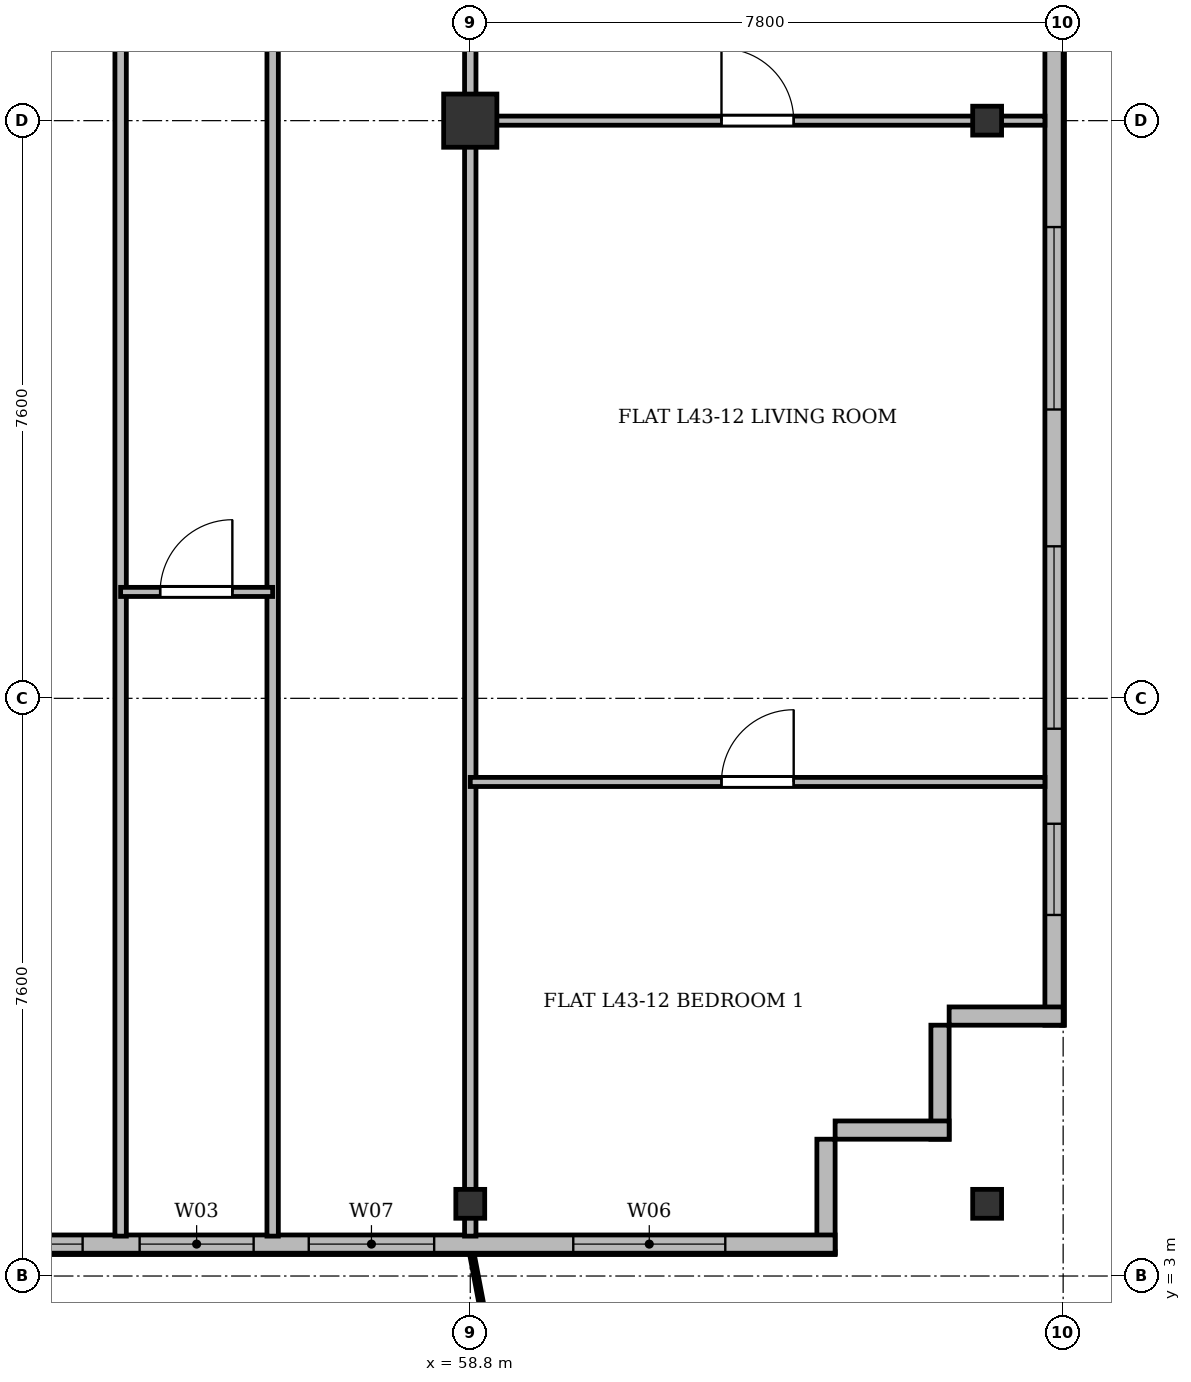
"""IFC4 building model, lengths in metres.
Left out: names, types, materials, properties, quantities, classifications, styles, units other than length and angle.
Written with IfcOpenShell. Run it as: python <this file> out.ifc"""

import sys

from ifc_helpers import new_model, si_unit, direction, frame, frame_2d, origin, origin_2d, place, context, subcontext, project, spatial, rectangle, i_section, extrude, source, transform, mapped, element, fill, save


model = new_model("IFC4")
c1 = context("Model", 3, precision=1e-05, world=origin(), true_north=direction((0.0, 1.0)))
c2 = subcontext(c1, "Body", "Model", "MODEL_VIEW")
j1 = project(units=[si_unit("LENGTHUNIT", "METRE"), si_unit("PLANEANGLEUNIT", "RADIAN")], contexts=[c1])
p1 = place(None, origin())
s1 = spatial("IfcSite", under=j1, at=p1, CompositionType="ELEMENT")
p2 = place(p1, origin())
s2 = spatial("IfcBuilding", under=s1, at=p2, CompositionType="ELEMENT")
p3 = place(p2, frame((0.0, 0.0, 164.5)))
s3 = spatial("IfcBuildingStorey", under=s2, at=p3, CompositionType="ELEMENT", Elevation=164.5)
m1 = source(origin(), c2, "Body", "SweptSolid", [
    extrude(i_section(OverallWidth=0.38, OverallDepth=0.38, WebThickness=0.02, FlangeThickness=0.03, at=origin_2d()), origin(), (0.0, 0.0, 1.0), 3.6),
])
p4 = place(p3, frame((58.8, 3.95, 0.0), z_axis=(0.0, 0.0, 1.0), x_axis=(1.0, 0.0, 0.0)))
e1 = element("IfcColumn", 1, at=p4, inside=s3, PredefinedType="COLUMN", context=c2, shape_type="MappedRepresentation", body=[
    mapped(m1, transform((0.0, 0.0, 0.0), x_axis=(1.0, 0.0, 0.0), y_axis=(0.0, 1.0, 0.0), z_axis=(0.0, 0.0, 1.0), scale=1.0)),
])
m2 = source(origin(), c2, "Body", "SweptSolid", [
    extrude(rectangle(XDim=0.7, YDim=0.7, at=origin_2d()), origin(), (0.0, 0.0, 1.0), 3.6),
])
p5 = place(p3, frame((58.8, 18.2, 0.0), z_axis=(0.0, 0.0, 1.0), x_axis=(1.0, 0.0, 0.0)))
e2 = element("IfcColumn", 2, at=p5, inside=s3, PredefinedType="COLUMN", context=c2, shape_type="MappedRepresentation", body=[
    mapped(m2, transform((0.0, 0.0, 0.0), x_axis=(1.0, 0.0, 0.0), y_axis=(0.0, 1.0, 0.0), z_axis=(0.0, 0.0, 1.0), scale=1.0)),
])
for number, where, z_axis, x_axis in (
    (3, (65.6, 3.95, 0.0), (0.0, 0.0, 1.0), (1.0, 0.0, 0.0)),
    (4, (65.6, 18.2, 0.0), (0.0, 0.0, 1.0), (1.0, 0.0, 0.0)),
):
    element("IfcColumn", number, at=place(p3, frame(where, z_axis=z_axis, x_axis=x_axis)), inside=s3, PredefinedType="COLUMN", context=c2, shape_type="MappedRepresentation", body=[
        mapped(m1, transform((0.0, 0.0, 0.0), x_axis=(1.0, 0.0, 0.0), y_axis=(0.0, 1.0, 0.0), z_axis=(0.0, 0.0, 1.0), scale=1.0)),
    ])
p6 = place(p3, frame((66.48, 45.5, 0.0), z_axis=(0.0, 0.0, 1.0), x_axis=(0.0, -1.0, 0.0)))
e5 = element("IfcWall", 5, at=p6, inside=s3, PredefinedType="SOLIDWALL", context=c2, shape_type="SweptSolid", body=[
    extrude(rectangle(XDim=39.2, YDim=0.24, at=frame_2d((19.6, 0.0))), origin(), (0.0, 0.0, 1.0), 3.35),
])
p7 = place(p6, frame((36.55, 0.0, 0.92)))
e6 = element("IfcOpeningElement", 6, at=p7, cuts=e5, PredefinedType="OPENING", context=c2, shape_type="SweptSolid", body=[
    extrude(rectangle(XDim=1.2, YDim=1.65, at=frame_2d((0.6, 0.825))), frame((0.0, 0.13, 0.0), z_axis=(0.0, -1.0, 0.0), x_axis=(1.0, 0.0, 0.0)), (0.0, 0.0, 1.0), 0.26),
])
p8 = place(p6, frame((32.9, 0.0, 0.92)))
e7 = element("IfcOpeningElement", 7, at=p8, cuts=e5, PredefinedType="OPENING", context=c2, shape_type="SweptSolid", body=[
    extrude(rectangle(XDim=2.4, YDim=2.1, at=frame_2d((1.2, 1.05))), frame((0.0, 0.13, 0.0), z_axis=(0.0, -1.0, 0.0), x_axis=(1.0, 0.0, 0.0)), (0.0, 0.0, 1.0), 0.26),
])
p9 = place(p6, frame((28.7, 0.0, 0.92)))
e8 = element("IfcOpeningElement", 8, at=p9, cuts=e5, PredefinedType="OPENING", context=c2, shape_type="SweptSolid", body=[
    extrude(rectangle(XDim=2.4, YDim=2.1, at=frame_2d((1.2, 1.05))), frame((0.0, 0.13, 0.0), z_axis=(0.0, -1.0, 0.0), x_axis=(1.0, 0.0, 0.0)), (0.0, 0.0, 1.0), 0.26),
])
p10 = place(p6, frame((21.5, 0.0, 0.92)))
e9 = element("IfcOpeningElement", 9, at=p10, cuts=e5, PredefinedType="OPENING", context=c2, shape_type="SweptSolid", body=[
    extrude(rectangle(XDim=2.4, YDim=2.1, at=frame_2d((1.2, 1.05))), frame((0.0, 0.13, 0.0), z_axis=(0.0, -1.0, 0.0), x_axis=(1.0, 0.0, 0.0)), (0.0, 0.0, 1.0), 0.26),
])
p11 = place(p6, frame((7.5, 0.0, 0.92)))
e10 = element("IfcOpeningElement", 10, at=p11, cuts=e5, PredefinedType="OPENING", context=c2, shape_type="SweptSolid", body=[
    extrude(rectangle(XDim=2.4, YDim=2.1, at=frame_2d((1.2, 1.05))), frame((0.0, 0.13, 0.0), z_axis=(0.0, -1.0, 0.0), x_axis=(1.0, 0.0, 0.0)), (0.0, 0.0, 1.0), 0.26),
])
p12 = place(p6, frame((1.15, 0.0, 0.92)))
e11 = element("IfcOpeningElement", 11, at=p12, cuts=e5, PredefinedType="OPENING", context=c2, shape_type="SweptSolid", body=[
    extrude(rectangle(XDim=1.2, YDim=1.65, at=frame_2d((0.6, 0.825))), frame((0.0, 0.13, 0.0), z_axis=(0.0, -1.0, 0.0), x_axis=(1.0, 0.0, 0.0)), (0.0, 0.0, 1.0), 0.26),
])
p13 = place(p3, frame((66.6, 6.42, 0.0), z_axis=(0.0, 0.0, 1.0), x_axis=(-1.0, 0.0, 0.0)))
e12 = element("IfcWall", 12, at=p13, inside=s3, PredefinedType="SOLIDWALL", context=c2, shape_type="SweptSolid", body=[
    extrude(rectangle(XDim=1.5, YDim=0.24, at=frame_2d((0.75, 0.0))), origin(), (0.0, 0.0, 1.0), 2.85),
])
for number, where, z_axis, x_axis in (
    (13, (64.98, 6.3, 0.0), (0.0, 0.0, 1.0), (0.0, -1.0, 0.0)),
    (14, (65.1, 4.92, 0.0), (0.0, 0.0, 1.0), (-1.0, 0.0, 0.0)),
):
    element("IfcWall", number, at=place(p3, frame(where, z_axis=z_axis, x_axis=x_axis)), inside=s3, PredefinedType="SOLIDWALL", context=c2, shape_type="SweptSolid", body=[
        extrude(rectangle(XDim=1.5, YDim=0.24, at=frame_2d((0.75, 0.0))), origin(), (0.0, 0.0, 1.0), 3.35),
    ])
p14 = place(p3, frame((63.48, 4.8, 0.0), z_axis=(0.0, 0.0, 1.0), x_axis=(0.0, -1.0, 0.0)))
e15 = element("IfcWall", 15, at=p14, inside=s3, PredefinedType="SOLIDWALL", context=c2, shape_type="SweptSolid", body=[
    extrude(rectangle(XDim=1.5, YDim=0.24, at=frame_2d((0.75, 0.0))), origin(), (0.0, 0.0, 1.0), 2.75),
])
p15 = place(p3, frame((63.6, 3.42, 0.0), z_axis=(0.0, 0.0, 1.0), x_axis=(-1.0, 0.0, 0.0)))
e16 = element("IfcWall", 16, at=p15, inside=s3, PredefinedType="SOLIDWALL", context=c2, shape_type="SweptSolid", body=[
    extrude(rectangle(XDim=52.8, YDim=0.24, at=frame_2d((26.4, 0.0))), origin(), (0.0, 0.0, 1.0), 3.35),
])
p16 = place(p15, frame((1.445, 0.0, 0.9)))
e17 = element("IfcOpeningElement", 17, at=p16, cuts=e16, PredefinedType="OPENING", context=c2, shape_type="SweptSolid", body=[
    extrude(rectangle(XDim=2.0, YDim=1.95, at=frame_2d((1.0, 0.975))), frame((0.0, 0.13, 0.0), z_axis=(0.0, -1.0, 0.0), x_axis=(1.0, 0.0, 0.0)), (0.0, 0.0, 1.0), 0.26),
])
p17 = place(p15, frame((5.275, 0.0, 0.9)))
e18 = element("IfcOpeningElement", 18, at=p17, cuts=e16, PredefinedType="OPENING", context=c2, shape_type="SweptSolid", body=[
    extrude(rectangle(XDim=1.65, YDim=1.85, at=frame_2d((0.825, 0.925))), frame((0.0, 0.13, 0.0), z_axis=(0.0, -1.0, 0.0), x_axis=(1.0, 0.0, 0.0)), (0.0, 0.0, 1.0), 0.26),
])
p18 = place(p15, frame((7.65, 0.0, 0.9)))
e19 = element("IfcOpeningElement", 19, at=p18, cuts=e16, PredefinedType="OPENING", context=c2, shape_type="SweptSolid", body=[
    extrude(rectangle(XDim=1.5, YDim=1.75, at=frame_2d((0.75, 0.875))), frame((0.0, 0.13, 0.0), z_axis=(0.0, -1.0, 0.0), x_axis=(1.0, 0.0, 0.0)), (0.0, 0.0, 1.0), 0.26),
])
p19 = place(p15, frame((9.9, 0.0, 0.9)))
e20 = element("IfcOpeningElement", 20, at=p19, cuts=e16, PredefinedType="OPENING", context=c2, shape_type="SweptSolid", body=[
    extrude(rectangle(XDim=2.2, YDim=1.8, at=frame_2d((1.1, 0.9))), frame((0.0, 0.13, 0.0), z_axis=(0.0, -1.0, 0.0), x_axis=(1.0, 0.0, 0.0)), (0.0, 0.0, 1.0), 0.26),
])
p20 = place(p15, frame((13.62, 0.0, 0.0)))
e21 = element("IfcOpeningElement", 21, at=p20, cuts=e16, PredefinedType="OPENING", context=c2, shape_type="SweptSolid", body=[
    extrude(rectangle(XDim=1.2, YDim=2.2, at=frame_2d((0.6, 1.1))), frame((0.0, 0.13, 0.0), z_axis=(0.0, -1.0, 0.0), x_axis=(1.0, 0.0, 0.0)), (0.0, 0.0, 1.0), 0.26),
])
p21 = place(p15, frame((15.45, 0.0, 0.9)))
e22 = element("IfcOpeningElement", 22, at=p21, cuts=e16, PredefinedType="OPENING", context=c2, shape_type="SweptSolid", body=[
    extrude(rectangle(XDim=1.5, YDim=1.75, at=frame_2d((0.75, 0.875))), frame((0.0, 0.13, 0.0), z_axis=(0.0, -1.0, 0.0), x_axis=(1.0, 0.0, 0.0)), (0.0, 0.0, 1.0), 0.26),
])
p22 = place(p15, frame((17.775, 0.0, 0.9)))
e23 = element("IfcOpeningElement", 23, at=p22, cuts=e16, PredefinedType="OPENING", context=c2, shape_type="SweptSolid", body=[
    extrude(rectangle(XDim=1.65, YDim=1.85, at=frame_2d((0.825, 0.925))), frame((0.0, 0.13, 0.0), z_axis=(0.0, -1.0, 0.0), x_axis=(1.0, 0.0, 0.0)), (0.0, 0.0, 1.0), 0.26),
])
p23 = place(p15, frame((22.2, 0.0, 0.9)))
e24 = element("IfcOpeningElement", 24, at=p23, cuts=e16, PredefinedType="OPENING", context=c2, shape_type="SweptSolid", body=[
    extrude(rectangle(XDim=1.8, YDim=1.8, at=frame_2d((0.9, 0.9))), frame((0.0, 0.13, 0.0), z_axis=(0.0, -1.0, 0.0), x_axis=(1.0, 0.0, 0.0)), (0.0, 0.0, 1.0), 0.26),
])
p24 = place(p15, frame((28.6, 0.0, 0.9)))
e25 = element("IfcOpeningElement", 25, at=p24, cuts=e16, PredefinedType="OPENING", context=c2, shape_type="SweptSolid", body=[
    extrude(rectangle(XDim=2.2, YDim=1.8, at=frame_2d((1.1, 0.9))), frame((0.0, 0.13, 0.0), z_axis=(0.0, -1.0, 0.0), x_axis=(1.0, 0.0, 0.0)), (0.0, 0.0, 1.0), 0.26),
])
p25 = place(p15, frame((35.85, 0.0, 0.9)))
e26 = element("IfcOpeningElement", 26, at=p25, cuts=e16, PredefinedType="OPENING", context=c2, shape_type="SweptSolid", body=[
    extrude(rectangle(XDim=1.5, YDim=1.75, at=frame_2d((0.75, 0.875))), frame((0.0, 0.13, 0.0), z_axis=(0.0, -1.0, 0.0), x_axis=(1.0, 0.0, 0.0)), (0.0, 0.0, 1.0), 0.26),
])
p26 = place(p15, frame((41.656, 0.0, 0.0)))
e27 = element("IfcOpeningElement", 27, at=p26, cuts=e16, PredefinedType="OPENING", context=c2, shape_type="SweptSolid", body=[
    extrude(rectangle(XDim=1.2, YDim=2.2, at=frame_2d((0.6, 1.1))), frame((0.0, 0.13, 0.0), z_axis=(0.0, -1.0, 0.0), x_axis=(1.0, 0.0, 0.0)), (0.0, 0.0, 1.0), 0.26),
])
p27 = place(p15, frame((43.65, 0.0, 0.9)))
e28 = element("IfcOpeningElement", 28, at=p27, cuts=e16, PredefinedType="OPENING", context=c2, shape_type="SweptSolid", body=[
    extrude(rectangle(XDim=1.5, YDim=1.75, at=frame_2d((0.75, 0.875))), frame((0.0, 0.13, 0.0), z_axis=(0.0, -1.0, 0.0), x_axis=(1.0, 0.0, 0.0)), (0.0, 0.0, 1.0), 0.26),
])
p28 = place(p15, frame((45.8, 0.0, 0.9)))
e29 = element("IfcOpeningElement", 29, at=p28, cuts=e16, PredefinedType="OPENING", context=c2, shape_type="SweptSolid", body=[
    extrude(rectangle(XDim=1.8, YDim=1.8, at=frame_2d((0.9, 0.9))), frame((0.0, 0.13, 0.0), z_axis=(0.0, -1.0, 0.0), x_axis=(1.0, 0.0, 0.0)), (0.0, 0.0, 1.0), 0.26),
])
p29 = place(p15, frame((49.255, 0.0, 0.9)))
e30 = element("IfcOpeningElement", 30, at=p29, cuts=e16, PredefinedType="OPENING", context=c2, shape_type="SweptSolid", body=[
    extrude(rectangle(XDim=2.2, YDim=1.8, at=frame_2d((1.1, 0.9))), frame((0.0, 0.13, 0.0), z_axis=(0.0, -1.0, 0.0), x_axis=(1.0, 0.0, 0.0)), (0.0, 0.0, 1.0), 0.26),
])
p30 = place(p3, frame((58.8, 3.525, 0.0), z_axis=(0.0, 0.0, 1.0), x_axis=(0.0, 1.0, 0.0)))
e31 = element("IfcWall", 31, at=p30, inside=s3, PredefinedType="PARTITIONING", context=c2, shape_type="SweptSolid", body=[
    extrude(rectangle(XDim=27.275, YDim=0.15, at=frame_2d((13.638, 0.0))), origin(), (0.0, 0.0, 1.0), 2.85),
])
for number, where, z_axis, x_axis in (
    (32, (54.2, 3.525, 0.0), (0.0, 0.0, 1.0), (0.0, 1.0, 0.0)),
    (33, (56.2, 3.525, 0.0), (0.0, 0.0, 1.0), (0.0, 1.0, 0.0)),
):
    element("IfcWall", number, at=place(p3, frame(where, z_axis=z_axis, x_axis=x_axis)), inside=s3, PredefinedType="PARTITIONING", context=c2, shape_type="SweptSolid", body=[
        extrude(rectangle(XDim=27.275, YDim=0.15, at=frame_2d((13.638, 0.0))), origin(), (0.0, 0.0, 1.0), 2.75),
    ])
p31 = place(p3, frame((54.2, 12.0, 0.0), z_axis=(0.0, 0.0, 1.0), x_axis=(1.0, 0.0, 0.0)))
e34 = element("IfcWall", 34, at=p31, inside=s3, PredefinedType="PARTITIONING", context=c2, shape_type="SweptSolid", body=[
    extrude(rectangle(XDim=2.0, YDim=0.12, at=frame_2d((1.0, 0.0))), origin(), (0.0, 0.0, 1.0), 3.35),
])
p32 = place(p31, frame((0.52, 0.0, 0.0)))
e35 = element("IfcOpeningElement", 35, at=p32, cuts=e34, PredefinedType="OPENING", context=c2, shape_type="SweptSolid", body=[
    extrude(rectangle(XDim=0.95, YDim=2.15, at=frame_2d((0.475, 1.075))), frame((0.0, 0.07, 0.0), z_axis=(0.0, -1.0, 0.0), x_axis=(1.0, 0.0, 0.0)), (0.0, 0.0, 1.0), 0.14),
])
p33 = place(p3, frame((58.8, 18.2, 0.0), z_axis=(0.0, 0.0, 1.0), x_axis=(1.0, 0.0, 0.0)))
e36 = element("IfcWall", 36, at=p33, inside=s3, PredefinedType="PARTITIONING", context=c2, shape_type="SweptSolid", body=[
    extrude(rectangle(XDim=7.56, YDim=0.12, at=frame_2d((3.78, 0.0))), origin(), (0.0, 0.0, 1.0), 2.75),
])
p34 = place(p33, frame((3.305, 0.0, 0.0)))
e37 = element("IfcOpeningElement", 37, at=p34, cuts=e36, PredefinedType="OPENING", context=c2, shape_type="SweptSolid", body=[
    extrude(rectangle(XDim=0.95, YDim=2.15, at=frame_2d((0.475, 1.075))), frame((0.0, 0.07, 0.0), z_axis=(0.0, -1.0, 0.0), x_axis=(1.0, 0.0, 0.0)), (0.0, 0.0, 1.0), 0.14),
])
p35 = place(p3, frame((58.8, 9.5, 0.0), z_axis=(0.0, 0.0, 1.0), x_axis=(1.0, 0.0, 0.0)))
e38 = element("IfcWall", 38, at=p35, inside=s3, PredefinedType="PARTITIONING", context=c2, shape_type="SweptSolid", body=[
    extrude(rectangle(XDim=7.56, YDim=0.12, at=frame_2d((3.78, 0.0))), origin(), (0.0, 0.0, 1.0), 2.85),
])
p36 = place(p35, frame((3.305, 0.0, 0.0)))
e39 = element("IfcOpeningElement", 39, at=p36, cuts=e38, PredefinedType="OPENING", context=c2, shape_type="SweptSolid", body=[
    extrude(rectangle(XDim=0.95, YDim=2.15, at=frame_2d((0.475, 1.075))), frame((0.0, 0.07, 0.0), z_axis=(0.0, -1.0, 0.0), x_axis=(1.0, 0.0, 0.0)), (0.0, 0.0, 1.0), 0.14),
])
m3 = source(origin(), c2, "Body", "SweptSolid", [
    extrude(rectangle(XDim=1.2, YDim=1.65, at=frame_2d((0.6, 0.825))), frame((0.0, 0.03, 0.0), z_axis=(0.0, -1.0, 0.0), x_axis=(1.0, 0.0, 0.0)), (0.0, 0.0, 1.0), 0.06),
])
p37 = place(p7, origin())
e40 = element("IfcWindow", 40, at=p37, inside=s3, PartitioningType="SINGLE_PANEL", PredefinedType="WINDOW", context=c2, shape_type="MappedRepresentation", body=[
    mapped(m3, transform((0.0, 0.0, 0.0), x_axis=(1.0, 0.0, 0.0), y_axis=(0.0, 1.0, 0.0), z_axis=(0.0, 0.0, 1.0), scale=1.0)),
])
fill(e6, e40)
m4 = source(origin(), c2, "Body", "SweptSolid", [
    extrude(rectangle(XDim=2.4, YDim=2.1, at=frame_2d((1.2, 1.05))), frame((0.0, 0.03, 0.0), z_axis=(0.0, -1.0, 0.0), x_axis=(1.0, 0.0, 0.0)), (0.0, 0.0, 1.0), 0.06),
])
p38 = place(p8, origin())
e41 = element("IfcWindow", 41, at=p38, inside=s3, PartitioningType="SINGLE_PANEL", PredefinedType="WINDOW", context=c2, shape_type="MappedRepresentation", body=[
    mapped(m4, transform((0.0, 0.0, 0.0), x_axis=(1.0, 0.0, 0.0), y_axis=(0.0, 1.0, 0.0), z_axis=(0.0, 0.0, 1.0), scale=1.0)),
])
fill(e7, e41)
p39 = place(p9, origin())
e42 = element("IfcWindow", 42, at=p39, inside=s3, PartitioningType="SINGLE_PANEL", PredefinedType="WINDOW", context=c2, shape_type="MappedRepresentation", body=[
    mapped(m4, transform((0.0, 0.0, 0.0), x_axis=(1.0, 0.0, 0.0), y_axis=(0.0, 1.0, 0.0), z_axis=(0.0, 0.0, 1.0), scale=1.0)),
])
fill(e8, e42)
m5 = source(origin(), c2, "Body", "SweptSolid", [
    extrude(rectangle(XDim=2.0, YDim=1.95, at=frame_2d((1.0, 0.975))), frame((0.0, 0.03, 0.0), z_axis=(0.0, -1.0, 0.0), x_axis=(1.0, 0.0, 0.0)), (0.0, 0.0, 1.0), 0.06),
])
p40 = place(p16, origin())
e43 = element("IfcWindow", 43, at=p40, inside=s3, PartitioningType="SINGLE_PANEL", PredefinedType="WINDOW", context=c2, shape_type="MappedRepresentation", body=[
    mapped(m5, transform((0.0, 0.0, 0.0), x_axis=(1.0, 0.0, 0.0), y_axis=(0.0, 1.0, 0.0), z_axis=(0.0, 0.0, 1.0), scale=1.0)),
])
fill(e17, e43)
m6 = source(origin(), c2, "Body", "SweptSolid", [
    extrude(rectangle(XDim=1.65, YDim=1.85, at=frame_2d((0.825, 0.925))), frame((0.0, 0.03, 0.0), z_axis=(0.0, -1.0, 0.0), x_axis=(1.0, 0.0, 0.0)), (0.0, 0.0, 1.0), 0.06),
])
p41 = place(p17, origin())
e44 = element("IfcWindow", 44, at=p41, inside=s3, PartitioningType="SINGLE_PANEL", PredefinedType="WINDOW", context=c2, shape_type="MappedRepresentation", body=[
    mapped(m6, transform((0.0, 0.0, 0.0), x_axis=(1.0, 0.0, 0.0), y_axis=(0.0, 1.0, 0.0), z_axis=(0.0, 0.0, 1.0), scale=1.0)),
])
fill(e18, e44)
m7 = source(origin(), c2, "Body", "SweptSolid", [
    extrude(rectangle(XDim=1.5, YDim=1.75, at=frame_2d((0.75, 0.875))), frame((0.0, 0.03, 0.0), z_axis=(0.0, -1.0, 0.0), x_axis=(1.0, 0.0, 0.0)), (0.0, 0.0, 1.0), 0.06),
])
p42 = place(p18, origin())
e45 = element("IfcWindow", 45, at=p42, inside=s3, PartitioningType="SINGLE_PANEL", PredefinedType="WINDOW", context=c2, shape_type="MappedRepresentation", body=[
    mapped(m7, transform((0.0, 0.0, 0.0), x_axis=(1.0, 0.0, 0.0), y_axis=(0.0, 1.0, 0.0), z_axis=(0.0, 0.0, 1.0), scale=1.0)),
])
fill(e19, e45)
m8 = source(origin(), c2, "Body", "SweptSolid", [
    extrude(rectangle(XDim=2.2, YDim=1.8, at=frame_2d((1.1, 0.9))), frame((0.0, 0.03, 0.0), z_axis=(0.0, -1.0, 0.0), x_axis=(1.0, 0.0, 0.0)), (0.0, 0.0, 1.0), 0.06),
])
p43 = place(p19, origin())
e46 = element("IfcWindow", 46, at=p43, inside=s3, PartitioningType="SINGLE_PANEL", PredefinedType="WINDOW", context=c2, shape_type="MappedRepresentation", body=[
    mapped(m8, transform((0.0, 0.0, 0.0), x_axis=(1.0, 0.0, 0.0), y_axis=(0.0, 1.0, 0.0), z_axis=(0.0, 0.0, 1.0), scale=1.0)),
])
fill(e20, e46)
m9 = source(origin(), c2, "Body", "SweptSolid", [
    extrude(rectangle(XDim=0.95, YDim=2.15, at=frame_2d((0.475, 1.075))), frame((0.0, 0.025, 0.0), z_axis=(0.0, -1.0, 0.0), x_axis=(1.0, 0.0, 0.0)), (0.0, 0.0, 1.0), 0.05),
])
p44 = place(p32, origin())
e47 = element("IfcDoor", 47, at=p44, inside=s3, OperationType="SINGLE_SWING_RIGHT", PredefinedType="DOOR", context=c2, shape_type="MappedRepresentation", body=[
    mapped(m9, transform((0.0, 0.0, 0.0), x_axis=(1.0, 0.0, 0.0), y_axis=(0.0, 1.0, 0.0), z_axis=(0.0, 0.0, 1.0), scale=1.0)),
])
fill(e35, e47)
p45 = place(p34, origin())
e48 = element("IfcDoor", 48, at=p45, inside=s3, OperationType="SINGLE_SWING_LEFT", PredefinedType="DOOR", context=c2, shape_type="MappedRepresentation", body=[
    mapped(m9, transform((0.0, 0.0, 0.0), x_axis=(1.0, 0.0, 0.0), y_axis=(0.0, 1.0, 0.0), z_axis=(0.0, 0.0, 1.0), scale=1.0)),
])
fill(e37, e48)
p46 = place(p36, origin())
e49 = element("IfcDoor", 49, at=p46, inside=s3, OperationType="SINGLE_SWING_RIGHT", PredefinedType="DOOR", context=c2, shape_type="MappedRepresentation", body=[
    mapped(m9, transform((0.0, 0.0, 0.0), x_axis=(1.0, 0.0, 0.0), y_axis=(0.0, 1.0, 0.0), z_axis=(0.0, 0.0, 1.0), scale=1.0)),
])
fill(e39, e49)
save(model, sys.argv[1])
